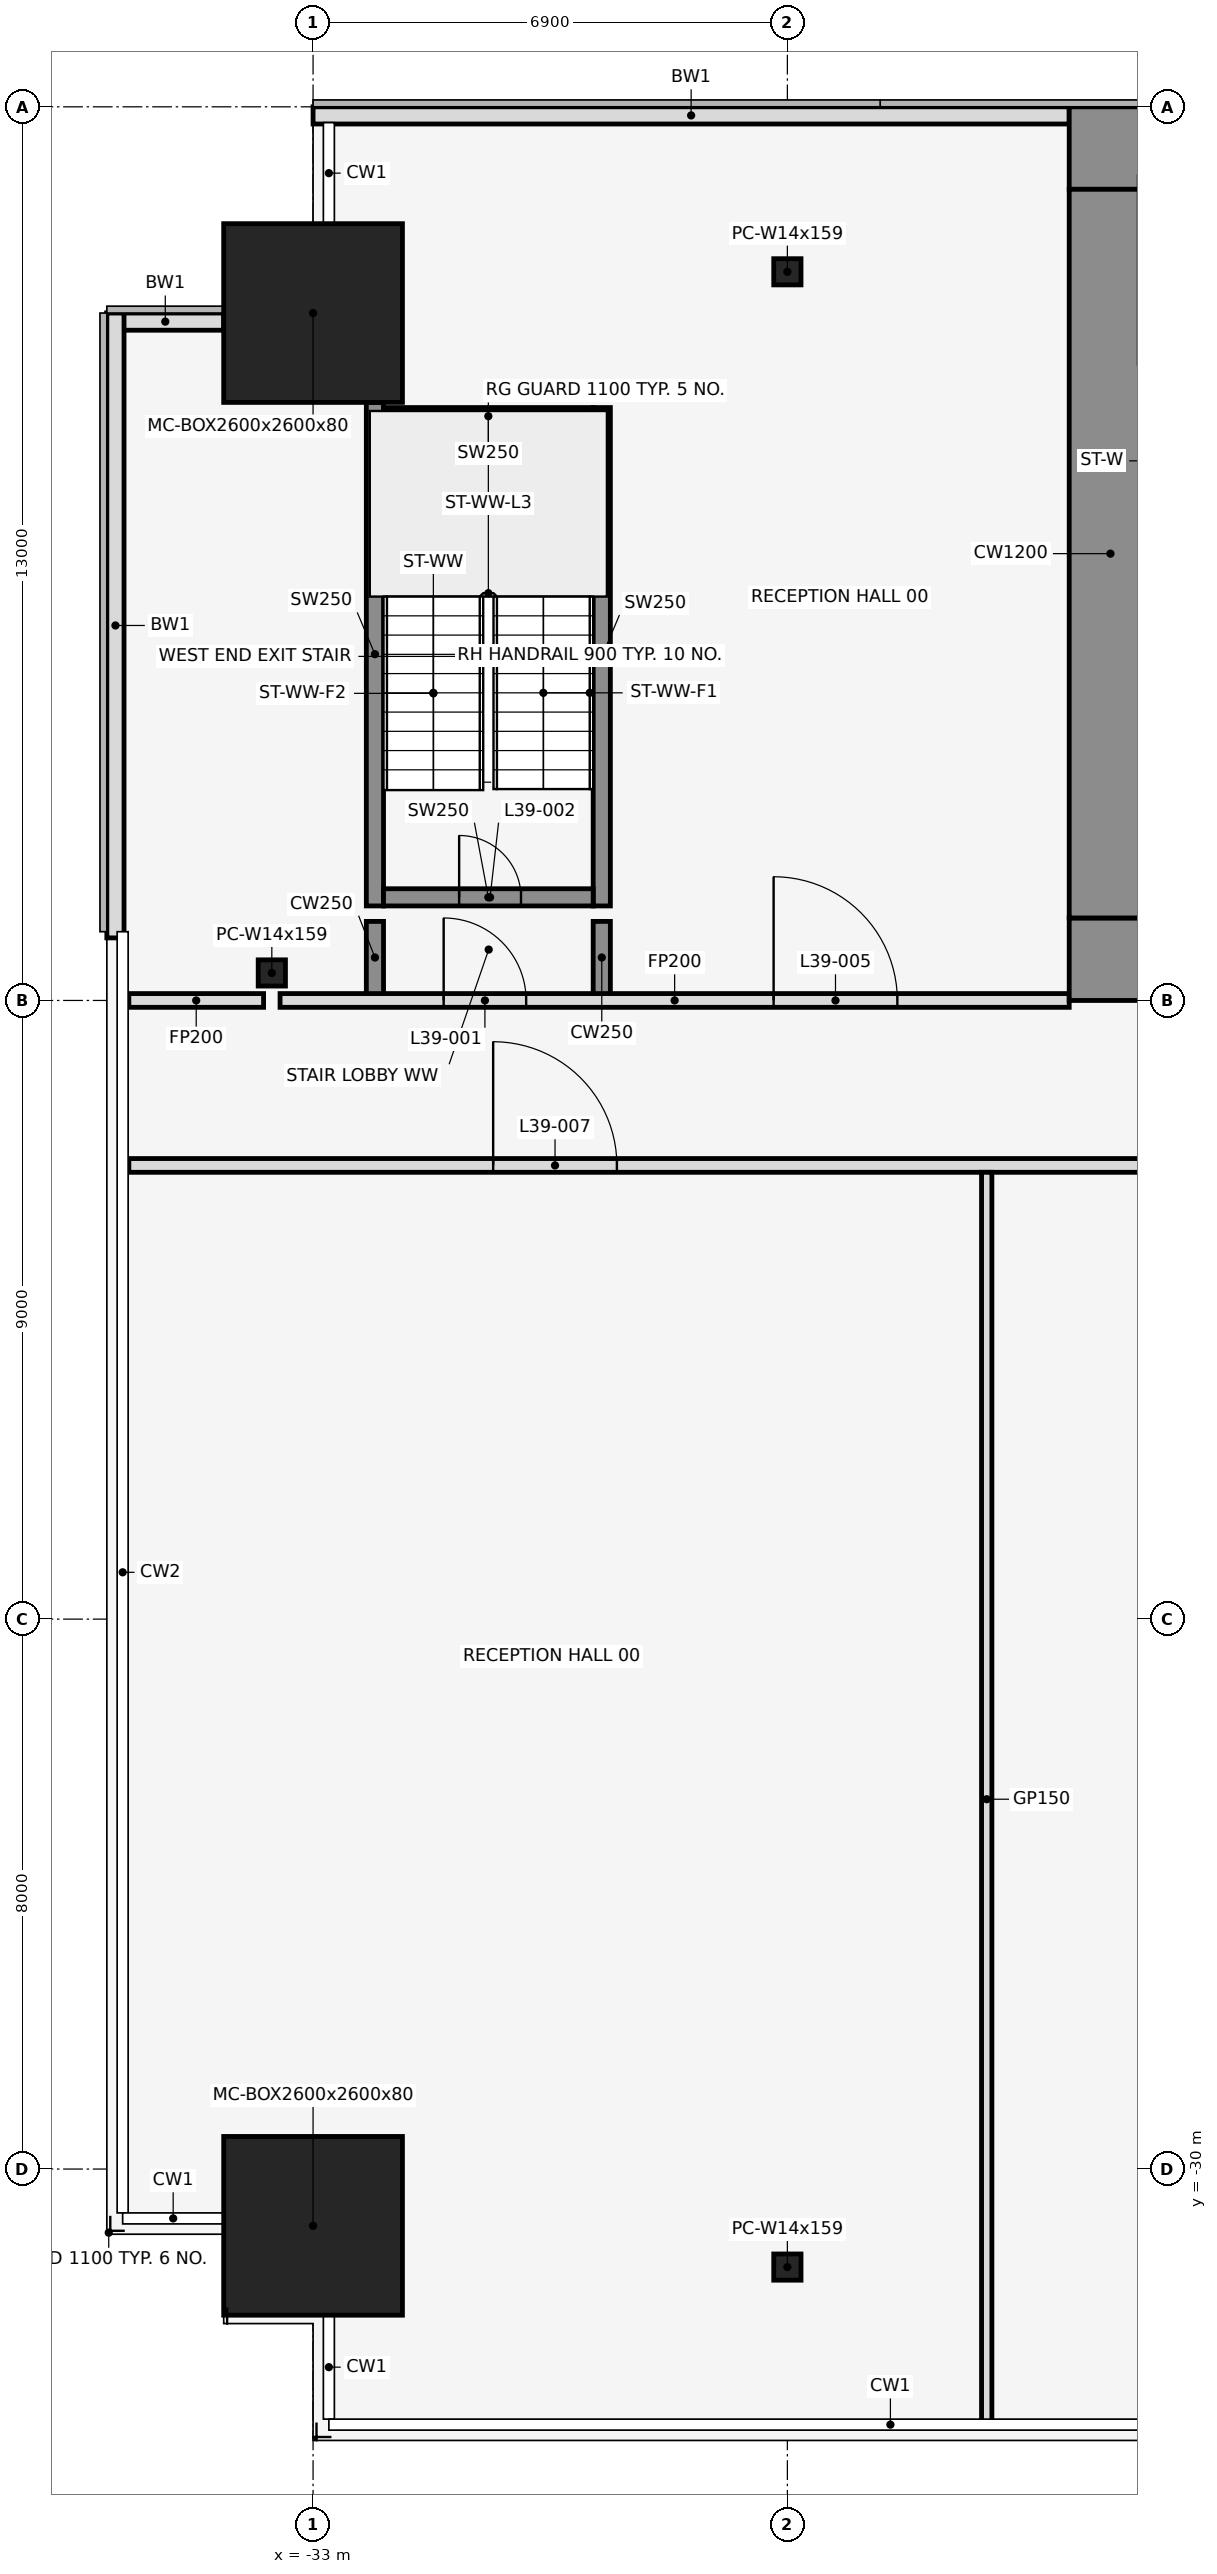
"""IFC4 building model, lengths in metres.
Left out: names, types, materials, properties, quantities, classifications, styles, units other than length and angle.
Written with IfcOpenShell. Run it as: python <this file> out.ifc"""

import sys

from ifc_helpers import new_model, si_unit, direction, frame, frame_2d, origin, origin_2d, place, context, subcontext, project, spatial, rectangle, hollow_rectangle, i_section, extrude, element, fill, save


model = new_model("IFC4")
c1 = context("Model", 3, precision=1e-05, world=origin(), true_north=direction((0.0, 1.0)))
c2 = subcontext(c1, "Body", "Model", "MODEL_VIEW")
j1 = project(units=[si_unit("LENGTHUNIT", "METRE"), si_unit("PLANEANGLEUNIT", "RADIAN")], contexts=[c1])
p1 = place(None, origin())
s1 = spatial("IfcSite", under=j1, at=p1, CompositionType="ELEMENT")
p2 = place(p1, origin())
s2 = spatial("IfcBuilding", under=s1, at=p2, CompositionType="ELEMENT")
p3 = place(p2, frame((0.0, 0.0, 177.3)))
s3 = spatial("IfcBuildingStorey", under=s2, at=p3, CompositionType="ELEMENT", Elevation=177.3)
for number, where, z_axis, x_axis in (
    (1, (-33.0, -30.826, 0.0), (0.0, 0.0, 1.0), (1.0, 0.0, 0.0)),
    (2, (-33.0, -3.0, 0.0), (0.0, 0.0, 1.0), (1.0, 0.0, 0.0)),
):
    element("IfcColumn", number, at=place(p3, frame(where, z_axis=z_axis, x_axis=x_axis)), inside=s3, PredefinedType="COLUMN", context=c2, shape_type="SweptSolid", body=[
        extrude(hollow_rectangle(XDim=2.6, YDim=2.6, WallThickness=0.08, at=origin_2d()), origin(), (0.0, 0.0, 1.0), 4.1),
    ])
for number, where, z_axis, x_axis in (
    (3, (-26.1, -31.426, 0.0), (0.0, 0.0, 1.0), (1.0, 0.0, 0.0)),
    (4, (-26.1, -2.4, 0.0), (0.0, 0.0, 1.0), (1.0, 0.0, 0.0)),
    (5, (-33.6, -12.6, 0.0), (0.0, 0.0, 1.0), (1.0, 0.0, 0.0)),
):
    element("IfcColumn", number, at=place(p3, frame(where, z_axis=z_axis, x_axis=x_axis)), inside=s3, PredefinedType="COLUMN", context=c2, shape_type="SweptSolid", body=[
        extrude(i_section(OverallWidth=0.396, OverallDepth=0.381, WebThickness=0.019, FlangeThickness=0.03, at=origin_2d()), origin(), (0.0, 0.0, 1.0), 4.1),
    ])
p4 = place(p3, frame((-22.0, -0.125, 0.0), z_axis=(0.0, 0.0, 1.0), x_axis=(-1.0, 0.0, 0.0)))
e6 = element("IfcWall", 6, at=p4, inside=s3, PredefinedType="STANDARD", context=c2, shape_type="SweptSolid", body=[
    extrude(rectangle(XDim=11.0, YDim=0.25, at=frame_2d((5.5, 0.0))), origin(), (0.0, 0.0, 1.0), 3.95),
])
p5 = place(p3, frame((-34.3, -3.125, 0.0), z_axis=(0.0, 0.0, 1.0), x_axis=(-1.0, 0.0, 0.0)))
e7 = element("IfcWall", 7, at=p5, inside=s3, PredefinedType="STANDARD", context=c2, shape_type="SweptSolid", body=[
    extrude(rectangle(XDim=1.7, YDim=0.25, at=frame_2d((0.85, 0.0))), origin(), (0.0, 0.0, 1.0), 3.95),
])
p6 = place(p3, frame((-35.875, -3.0, 0.0), z_axis=(0.0, 0.0, 1.0), x_axis=(0.0, -1.0, 0.0)))
e8 = element("IfcWall", 8, at=p6, inside=s3, PredefinedType="STANDARD", context=c2, shape_type="SweptSolid", body=[
    extrude(rectangle(XDim=9.09, YDim=0.25, at=frame_2d((4.545, 0.0))), origin(), (0.0, 0.0, 1.0), 3.95),
])
p7 = place(p3, frame((-32.1, -11.625, 0.0), z_axis=(0.0, 0.0, 1.0), x_axis=(0.0, 1.0, 0.0)))
e9 = element("IfcWall", 9, at=p7, inside=s3, PredefinedType="SHEAR", context=c2, shape_type="SweptSolid", body=[
    extrude(rectangle(XDim=7.325, YDim=0.25, at=frame_2d((3.663, 0.0))), origin(), (0.0, 0.0, 1.0), 4.1),
])
p8 = place(p3, frame((-28.8, -11.625, 0.0), z_axis=(0.0, 0.0, 1.0), x_axis=(0.0, 1.0, 0.0)))
e10 = element("IfcWall", 10, at=p8, inside=s3, PredefinedType="SHEAR", context=c2, shape_type="SweptSolid", body=[
    extrude(rectangle(XDim=7.25, YDim=0.25, at=frame_2d((3.625, 0.0))), origin(), (0.0, 0.0, 1.0), 4.1),
])
p9 = place(p3, frame((-31.975, -11.5, 0.0), z_axis=(0.0, 0.0, 1.0), x_axis=(1.0, 0.0, 0.0)))
e11 = element("IfcWall", 11, at=p9, inside=s3, PredefinedType="SHEAR", context=c2, shape_type="SweptSolid", body=[
    extrude(rectangle(XDim=3.05, YDim=0.25, at=frame_2d((1.525, 0.0))), origin(), (0.0, 0.0, 1.0), 4.1),
])
p10 = place(p9, frame((1.1, 0.0, 0.0)))
e12 = element("IfcOpeningElement", 12, at=p10, cuts=e11, PredefinedType="OPENING", context=c2, shape_type="SweptSolid", body=[
    extrude(rectangle(XDim=0.9, YDim=2.1, at=frame_2d((0.45, 1.05))), frame((0.0, 0.137, 0.0), z_axis=(0.0, -1.0, 0.0), x_axis=(1.0, 0.0, 0.0)), (0.0, 0.0, 1.0), 0.274),
])
p11 = place(p3, frame((-31.975, -4.5, 0.0), z_axis=(0.0, 0.0, 1.0), x_axis=(1.0, 0.0, 0.0)))
e13 = element("IfcWall", 13, at=p11, inside=s3, PredefinedType="SHEAR", context=c2, shape_type="SweptSolid", body=[
    extrude(rectangle(XDim=3.05, YDim=0.25, at=frame_2d((1.525, 0.0))), origin(), (0.0, 0.0, 1.0), 4.1),
])
p12 = place(p3, frame((-35.68, -15.4, 0.0), z_axis=(0.0, 0.0, 1.0), x_axis=(1.0, 0.0, 0.0)))
e14 = element("IfcWall", 14, at=p12, inside=s3, PredefinedType="PARTITIONING", context=c2, shape_type="SweptSolid", body=[
    extrude(rectangle(XDim=71.36, YDim=0.2, at=frame_2d((35.68, 0.0))), origin(), (0.0, 0.0, 1.0), 2.84),
])
p13 = place(p12, frame((5.3, 0.0, 0.0)))
e15 = element("IfcOpeningElement", 15, at=p13, cuts=e14, PredefinedType="OPENING", context=c2, shape_type="SweptSolid", body=[
    extrude(rectangle(XDim=1.8, YDim=2.1, at=frame_2d((0.9, 1.05))), frame((0.0, 0.112, 0.0), z_axis=(0.0, -1.0, 0.0), x_axis=(1.0, 0.0, 0.0)), (0.0, 0.0, 1.0), 0.224),
])
p14 = place(p12, frame((15.88, 0.0, 0.0)))
e16 = element("IfcOpeningElement", 16, at=p14, cuts=e14, PredefinedType="OPENING", context=c2, shape_type="SweptSolid", body=[
    extrude(rectangle(XDim=1.8, YDim=2.1, at=frame_2d((0.9, 1.05))), frame((0.0, 0.112, 0.0), z_axis=(0.0, -1.0, 0.0), x_axis=(1.0, 0.0, 0.0)), (0.0, 0.0, 1.0), 0.224),
])
p15 = place(p12, frame((23.58, 0.0, 0.0)))
e17 = element("IfcOpeningElement", 17, at=p15, cuts=e14, PredefinedType="OPENING", context=c2, shape_type="SweptSolid", body=[
    extrude(rectangle(XDim=1.0, YDim=2.1, at=frame_2d((0.5, 1.05))), frame((0.0, 0.112, 0.0), z_axis=(0.0, -1.0, 0.0), x_axis=(1.0, 0.0, 0.0)), (0.0, 0.0, 1.0), 0.224),
])
p16 = place(p12, frame((28.98, 0.0, 0.0)))
e18 = element("IfcOpeningElement", 18, at=p16, cuts=e14, PredefinedType="OPENING", context=c2, shape_type="SweptSolid", body=[
    extrude(rectangle(XDim=1.8, YDim=2.1, at=frame_2d((0.9, 1.05))), frame((0.0, 0.112, 0.0), z_axis=(0.0, -1.0, 0.0), x_axis=(1.0, 0.0, 0.0)), (0.0, 0.0, 1.0), 0.224),
])
p17 = place(p12, frame((35.18, 0.0, 0.0)))
e19 = element("IfcOpeningElement", 19, at=p17, cuts=e14, PredefinedType="OPENING", context=c2, shape_type="SweptSolid", body=[
    extrude(rectangle(XDim=1.0, YDim=2.1, at=frame_2d((0.5, 1.05))), frame((0.0, 0.112, 0.0), z_axis=(0.0, -1.0, 0.0), x_axis=(1.0, 0.0, 0.0)), (0.0, 0.0, 1.0), 0.224),
])
p18 = place(p12, frame((40.58, 0.0, 0.0)))
e20 = element("IfcOpeningElement", 20, at=p18, cuts=e14, PredefinedType="OPENING", context=c2, shape_type="SweptSolid", body=[
    extrude(rectangle(XDim=1.8, YDim=2.1, at=frame_2d((0.9, 1.05))), frame((0.0, 0.112, 0.0), z_axis=(0.0, -1.0, 0.0), x_axis=(1.0, 0.0, 0.0)), (0.0, 0.0, 1.0), 0.224),
])
p19 = place(p12, frame((48.28, 0.0, 0.0)))
e21 = element("IfcOpeningElement", 21, at=p19, cuts=e14, PredefinedType="OPENING", context=c2, shape_type="SweptSolid", body=[
    extrude(rectangle(XDim=0.9, YDim=2.1, at=frame_2d((0.45, 1.05))), frame((0.0, 0.112, 0.0), z_axis=(0.0, -1.0, 0.0), x_axis=(1.0, 0.0, 0.0)), (0.0, 0.0, 1.0), 0.224),
])
p20 = place(p12, frame((56.58, 0.0, 0.0)))
e22 = element("IfcOpeningElement", 22, at=p20, cuts=e14, PredefinedType="OPENING", context=c2, shape_type="SweptSolid", body=[
    extrude(rectangle(XDim=1.8, YDim=2.1, at=frame_2d((0.9, 1.05))), frame((0.0, 0.112, 0.0), z_axis=(0.0, -1.0, 0.0), x_axis=(1.0, 0.0, 0.0)), (0.0, 0.0, 1.0), 0.224),
])
p21 = place(p12, frame((65.68, 0.0, 0.0)))
e23 = element("IfcOpeningElement", 23, at=p21, cuts=e14, PredefinedType="OPENING", context=c2, shape_type="SweptSolid", body=[
    extrude(rectangle(XDim=1.8, YDim=2.1, at=frame_2d((0.9, 1.05))), frame((0.0, 0.112, 0.0), z_axis=(0.0, -1.0, 0.0), x_axis=(1.0, 0.0, 0.0)), (0.0, 0.0, 1.0), 0.224),
])
p22 = place(p3, frame((-35.68, -13.0, 0.0), z_axis=(0.0, 0.0, 1.0), x_axis=(1.0, 0.0, 0.0)))
e24 = element("IfcWall", 24, at=p22, inside=s3, PredefinedType="PARTITIONING", context=c2, shape_type="SweptSolid", body=[
    extrude(rectangle(XDim=1.96, YDim=0.2, at=frame_2d((0.98, 0.0))), origin(), (0.0, 0.0, 1.0), 2.84),
])
p23 = place(p3, frame((-33.48, -13.0, 0.0), z_axis=(0.0, 0.0, 1.0), x_axis=(1.0, 0.0, 0.0)))
e25 = element("IfcWall", 25, at=p23, inside=s3, PredefinedType="PARTITIONING", context=c2, shape_type="SweptSolid", body=[
    extrude(rectangle(XDim=11.48, YDim=0.2, at=frame_2d((5.74, 0.0))), origin(), (0.0, 0.0, 1.0), 2.84),
])
p24 = place(p23, frame((2.38, 0.0, 0.0)))
e26 = element("IfcOpeningElement", 26, at=p24, cuts=e25, PredefinedType="OPENING", context=c2, shape_type="SweptSolid", body=[
    extrude(rectangle(XDim=1.2, YDim=2.1, at=frame_2d((0.6, 1.05))), frame((0.0, 0.112, 0.0), z_axis=(0.0, -1.0, 0.0), x_axis=(1.0, 0.0, 0.0)), (0.0, 0.0, 1.0), 0.224),
])
p25 = place(p23, frame((7.18, 0.0, 0.0)))
e27 = element("IfcOpeningElement", 27, at=p25, cuts=e25, PredefinedType="OPENING", context=c2, shape_type="SweptSolid", body=[
    extrude(rectangle(XDim=1.8, YDim=2.1, at=frame_2d((0.9, 1.05))), frame((0.0, 0.112, 0.0), z_axis=(0.0, -1.0, 0.0), x_axis=(1.0, 0.0, 0.0)), (0.0, 0.0, 1.0), 0.224),
])
for number, where, z_axis, x_axis in (
    (28, (-32.1, -12.9, 0.0), (0.0, 0.0, 1.0), (0.0, 1.0, 0.0)),
    (29, (-28.8, -12.9, 0.0), (0.0, 0.0, 1.0), (0.0, 1.0, 0.0)),
):
    element("IfcWall", number, at=place(p3, frame(where, z_axis=z_axis, x_axis=x_axis)), inside=s3, PredefinedType="SHEAR", context=c2, shape_type="SweptSolid", body=[
        extrude(rectangle(XDim=1.05, YDim=0.25, at=frame_2d((0.525, 0.0))), origin(), (0.0, 0.0, 1.0), 4.1),
    ])
p26 = place(p3, frame((-23.2, -33.74, 0.0), z_axis=(0.0, 0.0, 1.0), x_axis=(0.0, 1.0, 0.0)))
e30 = element("IfcWall", 30, at=p26, inside=s3, PredefinedType="PARTITIONING", context=c2, shape_type="SweptSolid", body=[
    extrude(rectangle(XDim=18.24, YDim=0.15, at=frame_2d((9.12, 0.0))), origin(), (0.0, 0.0, 1.0), 2.84),
])
p27 = place(p3, frame((-22.0, -0.6, 0.0), z_axis=(0.0, 0.0, 1.0), x_axis=(1.0, 0.0, 0.0)))
e31 = element("IfcWall", 31, at=p27, inside=s3, PredefinedType="SHEAR", context=c2, shape_type="SweptSolid", body=[
    extrude(rectangle(XDim=44.0, YDim=1.2, at=frame_2d((22.0, 0.0))), origin(), (0.0, 0.0, 1.0), 4.1),
])
p28 = place(p27, frame((18.55, 0.0, 0.0)))
e32 = element("IfcOpeningElement", 32, at=p28, cuts=e31, PredefinedType="OPENING", context=c2, shape_type="SweptSolid", body=[
    extrude(rectangle(XDim=0.9, YDim=2.1, at=frame_2d((0.45, 1.05))), frame((0.0, 0.612, 0.0), z_axis=(0.0, -1.0, 0.0), x_axis=(1.0, 0.0, 0.0)), (0.0, 0.0, 1.0), 1.224),
])
p29 = place(p27, frame((24.55, 0.0, 0.0)))
e33 = element("IfcOpeningElement", 33, at=p29, cuts=e31, PredefinedType="OPENING", context=c2, shape_type="SweptSolid", body=[
    extrude(rectangle(XDim=0.9, YDim=2.1, at=frame_2d((0.45, 1.05))), frame((0.0, 0.612, 0.0), z_axis=(0.0, -1.0, 0.0), x_axis=(1.0, 0.0, 0.0)), (0.0, 0.0, 1.0), 1.224),
])
p30 = place(p3, frame((-22.0, -12.4, 0.0), z_axis=(0.0, 0.0, 1.0), x_axis=(1.0, 0.0, 0.0)))
e34 = element("IfcWall", 34, at=p30, inside=s3, PredefinedType="SHEAR", context=c2, shape_type="SweptSolid", body=[
    extrude(rectangle(XDim=44.0, YDim=1.2, at=frame_2d((22.0, 0.0))), origin(), (0.0, 0.0, 1.0), 4.1),
])
p31 = place(p30, frame((2.2, 0.0, 0.0)))
e35 = element("IfcOpeningElement", 35, at=p31, cuts=e34, PredefinedType="OPENING", context=c2, shape_type="SweptSolid", body=[
    extrude(rectangle(XDim=1.2, YDim=2.1, at=frame_2d((0.6, 1.05))), frame((0.0, 0.612, 0.0), z_axis=(0.0, -1.0, 0.0), x_axis=(1.0, 0.0, 0.0)), (0.0, 0.0, 1.0), 1.224),
])
p32 = place(p30, frame((21.4, 0.0, 0.0)))
e36 = element("IfcOpeningElement", 36, at=p32, cuts=e34, PredefinedType="OPENING", context=c2, shape_type="SweptSolid", body=[
    extrude(rectangle(XDim=1.2, YDim=2.1, at=frame_2d((0.6, 1.05))), frame((0.0, 0.612, 0.0), z_axis=(0.0, -1.0, 0.0), x_axis=(1.0, 0.0, 0.0)), (0.0, 0.0, 1.0), 1.224),
])
p33 = place(p30, frame((40.6, 0.0, 0.0)))
e37 = element("IfcOpeningElement", 37, at=p33, cuts=e34, PredefinedType="OPENING", context=c2, shape_type="SweptSolid", body=[
    extrude(rectangle(XDim=1.2, YDim=2.1, at=frame_2d((0.6, 1.05))), frame((0.0, 0.612, 0.0), z_axis=(0.0, -1.0, 0.0), x_axis=(1.0, 0.0, 0.0)), (0.0, 0.0, 1.0), 1.224),
])
p34 = place(p30, frame((16.0, 0.0, 0.0)))
e38 = element("IfcOpeningElement", 38, at=p34, cuts=e34, PredefinedType="OPENING", context=c2, shape_type="SweptSolid", body=[
    extrude(rectangle(XDim=1.8, YDim=2.1, at=frame_2d((0.9, 1.05))), frame((0.0, 0.612, 0.0), z_axis=(0.0, -1.0, 0.0), x_axis=(1.0, 0.0, 0.0)), (0.0, 0.0, 1.0), 1.224),
])
p35 = place(p30, frame((6.3, 0.0, 0.0)))
e39 = element("IfcOpeningElement", 39, at=p35, cuts=e34, PredefinedType="OPENING", context=c2, shape_type="SweptSolid", body=[
    extrude(rectangle(XDim=1.2, YDim=2.1, at=frame_2d((0.6, 1.05))), frame((0.0, 0.612, 0.0), z_axis=(0.0, -1.0, 0.0), x_axis=(1.0, 0.0, 0.0)), (0.0, 0.0, 1.0), 1.224),
])
p36 = place(p30, frame((26.2, 0.0, 0.0)))
e40 = element("IfcOpeningElement", 40, at=p36, cuts=e34, PredefinedType="OPENING", context=c2, shape_type="SweptSolid", body=[
    extrude(rectangle(XDim=1.8, YDim=2.1, at=frame_2d((0.9, 1.05))), frame((0.0, 0.612, 0.0), z_axis=(0.0, -1.0, 0.0), x_axis=(1.0, 0.0, 0.0)), (0.0, 0.0, 1.0), 1.224),
])
p37 = place(p30, frame((36.5, 0.0, 0.0)))
e41 = element("IfcOpeningElement", 41, at=p37, cuts=e34, PredefinedType="OPENING", context=c2, shape_type="SweptSolid", body=[
    extrude(rectangle(XDim=1.2, YDim=2.1, at=frame_2d((0.6, 1.05))), frame((0.0, 0.612, 0.0), z_axis=(0.0, -1.0, 0.0), x_axis=(1.0, 0.0, 0.0)), (0.0, 0.0, 1.0), 1.224),
])
p38 = place(p3, frame((-21.4, -11.8, 0.0), z_axis=(0.0, 0.0, 1.0), x_axis=(0.0, 1.0, 0.0)))
e42 = element("IfcWall", 42, at=p38, inside=s3, PredefinedType="SHEAR", context=c2, shape_type="SweptSolid", body=[
    extrude(rectangle(XDim=10.6, YDim=1.2, at=frame_2d((5.3, 0.0))), origin(), (0.0, 0.0, 1.0), 4.1),
])
p39 = place(p24, origin())
e43 = element("IfcDoor", 43, at=p39, inside=s3, OperationType="SINGLE_SWING_LEFT", PredefinedType="DOOR", context=c2, shape_type="SweptSolid", body=[
    extrude(rectangle(XDim=1.2, YDim=2.1, at=frame_2d((0.6, 1.05))), frame((0.0, 0.025, 0.0), z_axis=(0.0, -1.0, 0.0), x_axis=(1.0, 0.0, 0.0)), (0.0, 0.0, 1.0), 0.05),
])
fill(e26, e43)
p40 = place(p10, origin())
e44 = element("IfcDoor", 44, at=p40, inside=s3, OperationType="SINGLE_SWING_LEFT", PredefinedType="DOOR", context=c2, shape_type="SweptSolid", body=[
    extrude(rectangle(XDim=0.9, YDim=2.1, at=frame_2d((0.45, 1.05))), frame((0.0, 0.025, 0.0), z_axis=(0.0, -1.0, 0.0), x_axis=(1.0, 0.0, 0.0)), (0.0, 0.0, 1.0), 0.05),
])
fill(e12, e44)
p41 = place(p25, origin())
e45 = element("IfcDoor", 45, at=p41, inside=s3, OperationType="SINGLE_SWING_LEFT", PredefinedType="DOOR", context=c2, shape_type="SweptSolid", body=[
    extrude(rectangle(XDim=1.8, YDim=2.1, at=frame_2d((0.9, 1.05))), frame((0.0, 0.025, 0.0), z_axis=(0.0, -1.0, 0.0), x_axis=(1.0, 0.0, 0.0)), (0.0, 0.0, 1.0), 0.05),
])
fill(e27, e45)
p42 = place(p13, origin())
e46 = element("IfcDoor", 46, at=p42, inside=s3, OperationType="SINGLE_SWING_LEFT", PredefinedType="DOOR", context=c2, shape_type="SweptSolid", body=[
    extrude(rectangle(XDim=1.8, YDim=2.1, at=frame_2d((0.9, 1.05))), frame((0.0, 0.025, 0.0), z_axis=(0.0, -1.0, 0.0), x_axis=(1.0, 0.0, 0.0)), (0.0, 0.0, 1.0), 0.05),
])
fill(e15, e46)
save(model, sys.argv[1])
